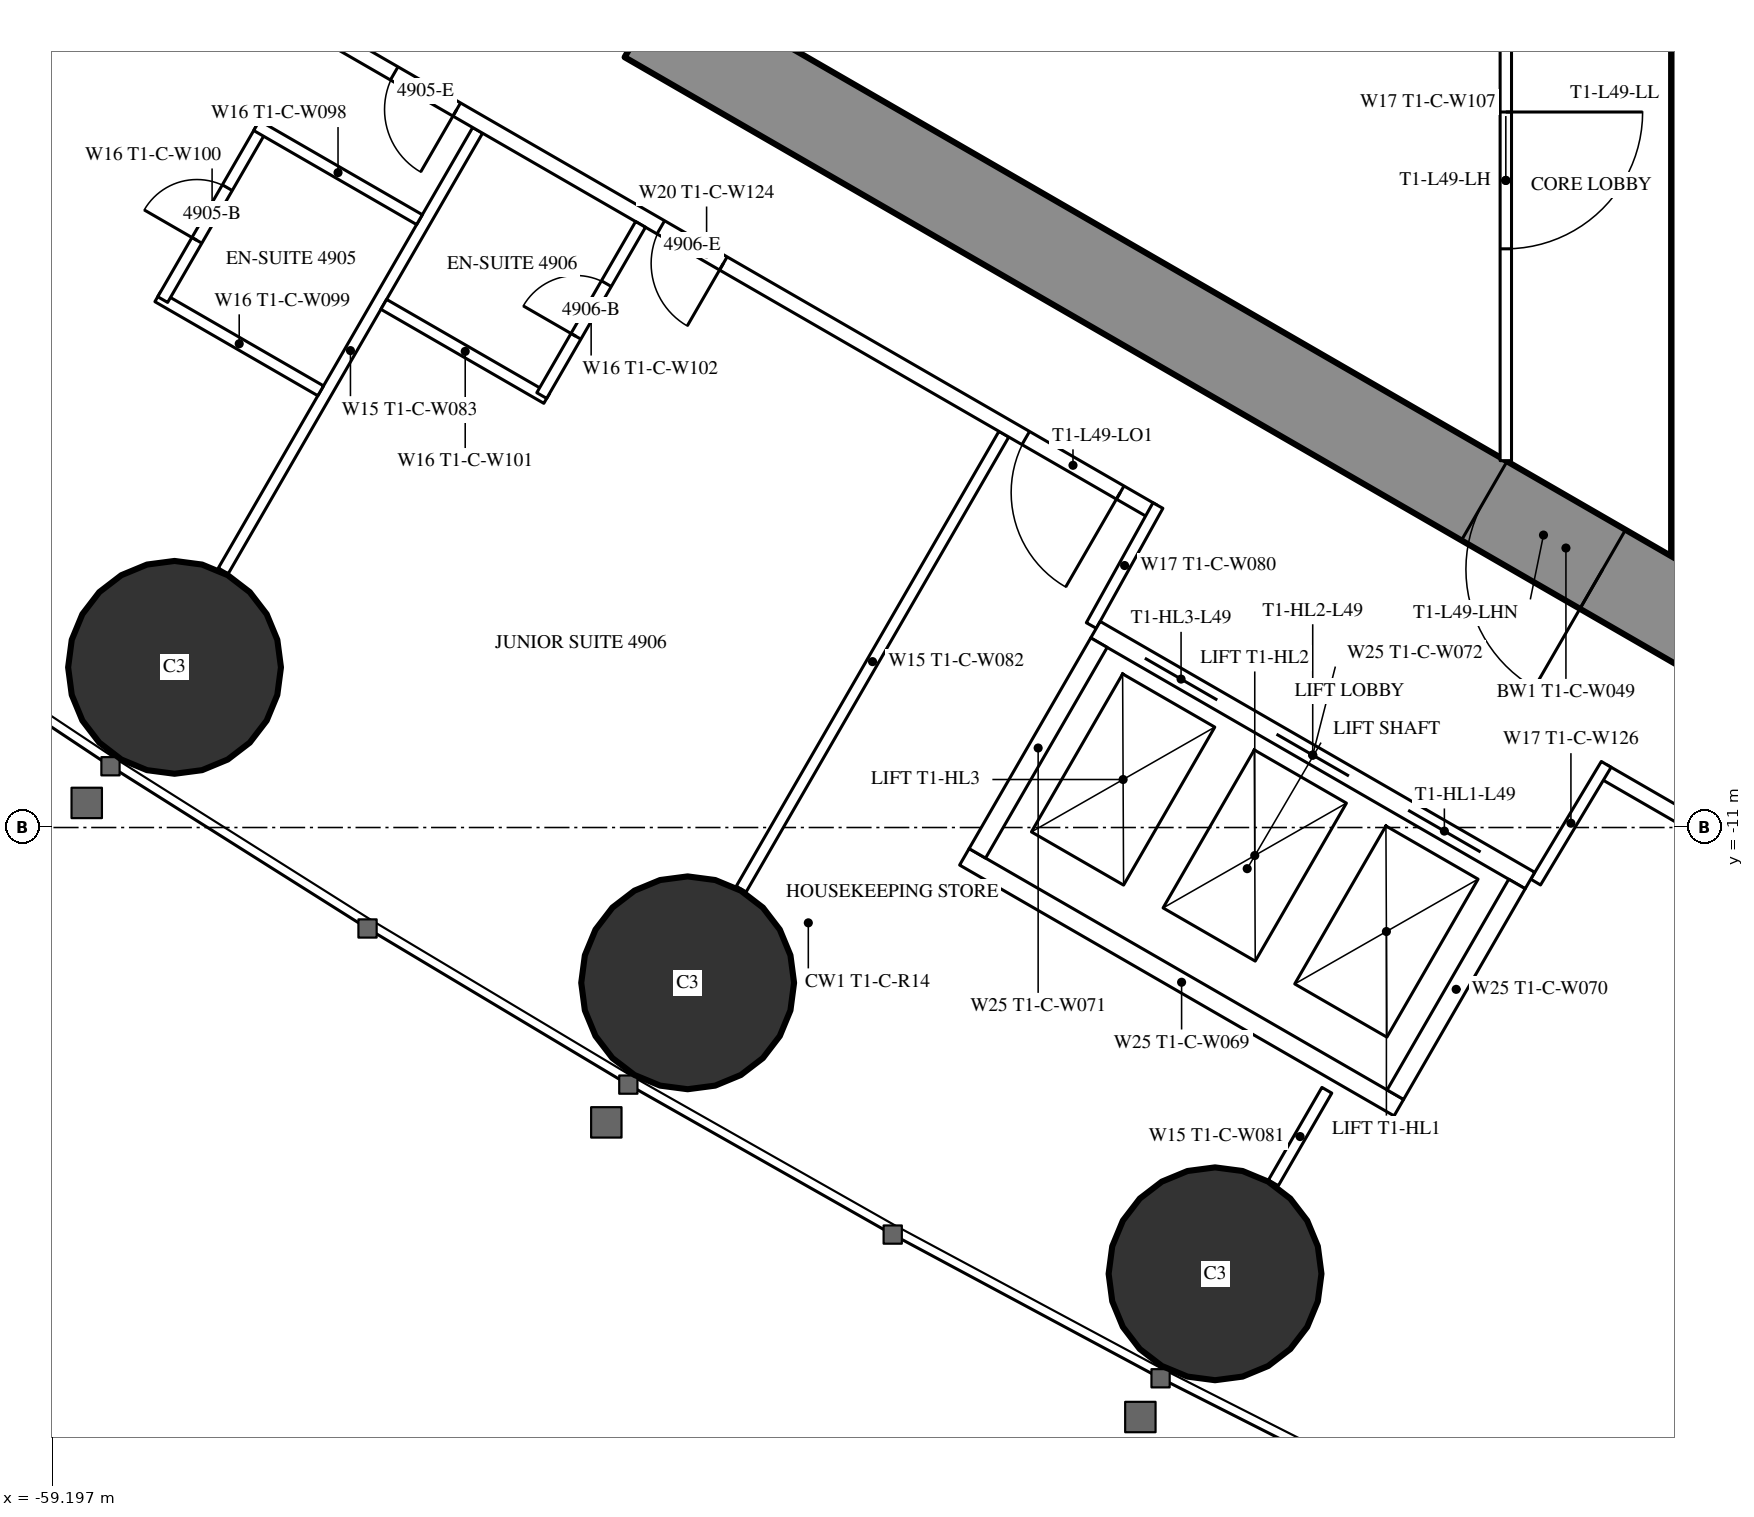
"""IFC4 building model, lengths in metres.
Left out: names, types, materials, properties, quantities, classifications, styles, units other than length and angle.
Written with IfcOpenShell. Run it as: python <this file> out.ifc"""

import sys

from ifc_helpers import new_model, si_unit, direction, frame, frame_2d, origin, origin_2d, place, context, subcontext, project, spatial, rectangle, circle, extrude, element, fill, save


model = new_model("IFC4")
c1 = context("Model", 3, precision=1e-05, world=origin(), true_north=direction((0.0, 1.0)))
c2 = subcontext(c1, "Body", "Model", "MODEL_VIEW")
j1 = project(units=[si_unit("LENGTHUNIT", "METRE"), si_unit("PLANEANGLEUNIT", "RADIAN")], contexts=[c1])
p1 = place(None, origin())
s1 = spatial("IfcSite", under=j1, at=p1, CompositionType="ELEMENT")
p2 = place(p1, origin())
s2 = spatial("IfcBuilding", under=s1, at=p2, CompositionType="ELEMENT")
p3 = place(p2, frame((0.0, 0.0, 184.3)))
s3 = spatial("IfcBuildingStorey", under=s2, at=p3, CompositionType="ELEMENT", Elevation=184.3)
for number, where, z_axis, x_axis in (
    (1, (-57.59, -8.893, 0.0), (0.0, 0.0, 1.0), (1.0, 0.0, 0.0)),
    (2, (-50.839, -13.043, 0.0), (0.0, 0.0, 1.0), (1.0, 0.0, 0.0)),
    (3, (-43.9, -16.871, 0.0), (0.0, 0.0, 1.0), (1.0, 0.0, 0.0)),
):
    element("IfcColumn", number, at=place(p3, frame(where, z_axis=z_axis, x_axis=x_axis)), inside=s3, PredefinedType="COLUMN", context=c2, shape_type="SweptSolid", body=[
        extrude(circle(Radius=1.4, at=origin_2d()), origin(), (0.0, 0.0, 1.0), 3.5),
    ])
p4 = place(p3, frame((-37.3, 8.6, 0.0), z_axis=(0.0, 0.0, 1.0), x_axis=(0.0, -1.0, 0.0)))
e4 = element("IfcWall", 4, at=p4, inside=s3, PredefinedType="SHEAR", context=c2, shape_type="SweptSolid", body=[
    extrude(rectangle(XDim=17.2, YDim=1.2, at=frame_2d((8.6, 0.0))), origin(), (0.0, 0.0, 1.0), 3.5),
])
p5 = place(p4, frame((7.7, 0.0, 0.0)))
e5 = element("IfcOpeningElement", 5, at=p5, cuts=e4, PredefinedType="OPENING", context=c2, shape_type="SweptSolid", body=[
    extrude(rectangle(XDim=1.8, YDim=2.2, at=frame_2d((0.9, 1.1))), frame((0.0, 0.61, 0.0), z_axis=(0.0, -1.0, 0.0), x_axis=(1.0, 0.0, 0.0)), (0.0, 0.0, 1.0), 1.22),
])
p6 = place(p3, frame((-27.2, -14.3, 0.0), z_axis=(0.0, 0.0, 1.0), x_axis=(-0.866024021859, 0.500002393557, 0.0)))
e6 = element("IfcWall", 6, at=p6, inside=s3, PredefinedType="SHEAR", context=c2, shape_type="SweptSolid", body=[
    extrude(rectangle(XDim=27.907, YDim=1.2, at=frame_2d((13.954, 0.0))), origin(), (0.0, 0.0, 1.0), 3.5),
])
p7 = place(p6, frame((4.6, 0.0, 0.0)))
e7 = element("IfcOpeningElement", 7, at=p7, cuts=e6, PredefinedType="OPENING", context=c2, shape_type="SweptSolid", body=[
    extrude(rectangle(XDim=1.0, YDim=2.2, at=frame_2d((0.5, 1.1))), frame((0.0, 0.61, 0.0), z_axis=(0.0, -1.0, 0.0), x_axis=(1.0, 0.0, 0.0)), (0.0, 0.0, 1.0), 1.22),
])
p8 = place(p6, frame((13.395, 0.0, 0.0)))
e8 = element("IfcOpeningElement", 8, at=p8, cuts=e6, PredefinedType="OPENING", context=c2, shape_type="SweptSolid", body=[
    extrude(rectangle(XDim=1.8, YDim=2.2, at=frame_2d((0.9, 1.1))), frame((0.0, 0.61, 0.0), z_axis=(0.0, -1.0, 0.0), x_axis=(1.0, 0.0, 0.0)), (0.0, 0.0, 1.0), 1.22),
])
p9 = place(p3, frame((-46.679, -5.825, 0.0), z_axis=(0.0, 0.0, 1.0), x_axis=(-0.500006839597, -0.866021454905, 0.0)))
e9 = element("IfcWall", 9, at=p9, inside=s3, PredefinedType="PARTITIONING", context=c2, shape_type="SweptSolid", body=[
    extrude(rectangle(XDim=6.911, YDim=0.15, at=frame_2d((3.456, 0.0))), origin(), (0.0, 0.0, 1.0), 2.3),
])
p10 = place(p3, frame((-53.602, -1.828, 0.0), z_axis=(0.0, 0.0, 1.0), x_axis=(-0.49999191814, -0.866030069798, 0.0)))
e10 = element("IfcWall", 10, at=p10, inside=s3, PredefinedType="PARTITIONING", context=c2, shape_type="SweptSolid", body=[
    extrude(rectangle(XDim=6.692, YDim=0.15, at=frame_2d((3.346, 0.0))), origin(), (0.0, 0.0, 1.0), 2.3),
])
p11 = place(p3, frame((-42.429, -14.457, 0.0), z_axis=(0.0, 0.0, 1.0), x_axis=(-0.5000578829, -0.865991982497, 0.0)))
e11 = element("IfcWall", 11, at=p11, inside=s3, PredefinedType="PARTITIONING", context=c2, shape_type="SweptSolid", body=[
    extrude(rectangle(XDim=1.407, YDim=0.15, at=frame_2d((0.704, 0.0))), origin(), (0.0, 0.0, 1.0), 3.25),
])
p12 = place(p3, frame((-27.86, -16.575, 0.0), z_axis=(0.0, 0.0, 1.0), x_axis=(-0.866027756871, 0.499995924312, 0.0)))
e12 = element("IfcWall", 12, at=p12, inside=s3, PredefinedType="PARTITIONING", context=c2, shape_type="SweptSolid", body=[
    extrude(rectangle(XDim=12.622, YDim=0.2, at=frame_2d((6.311, 0.0))), origin(), (0.0, 0.0, 1.0), 3.25),
])
p13 = place(p12, frame((3.75, 0.0, 0.0)))
e13 = element("IfcOpeningElement", 13, at=p13, cuts=e12, PredefinedType="OPENING", context=c2, shape_type="SweptSolid", body=[
    extrude(rectangle(XDim=0.95, YDim=2.2, at=frame_2d((0.475, 1.1))), frame((0.0, 0.11, 0.0), z_axis=(0.0, -1.0, 0.0), x_axis=(1.0, 0.0, 0.0)), (0.0, 0.0, 1.0), 0.22),
])
p14 = place(p3, frame((-44.715, -6.844, 0.0), z_axis=(0.0, 0.0, 1.0), x_axis=(-0.866025261224, 0.500000246922, 0.0)))
e14 = element("IfcWall", 14, at=p14, inside=s3, PredefinedType="PARTITIONING", context=c2, shape_type="SweptSolid", body=[
    extrude(rectangle(XDim=13.567, YDim=0.2, at=frame_2d((6.783, 0.0))), origin(), (0.0, 0.0, 1.0), 3.25),
])
p15 = place(p14, frame((10.579, 0.0, 0.0)))
e15 = element("IfcOpeningElement", 15, at=p15, cuts=e14, PredefinedType="OPENING", context=c2, shape_type="SweptSolid", body=[
    extrude(rectangle(XDim=0.95, YDim=2.2, at=frame_2d((0.475, 1.1))), frame((0.0, 0.11, 0.0), z_axis=(0.0, -1.0, 0.0), x_axis=(1.0, 0.0, 0.0)), (0.0, 0.0, 1.0), 0.22),
])
p16 = place(p14, frame((6.529, 0.0, 0.0)))
e16 = element("IfcOpeningElement", 16, at=p16, cuts=e14, PredefinedType="OPENING", context=c2, shape_type="SweptSolid", body=[
    extrude(rectangle(XDim=0.95, YDim=2.2, at=frame_2d((0.475, 1.1))), frame((0.0, 0.11, 0.0), z_axis=(0.0, -1.0, 0.0), x_axis=(1.0, 0.0, 0.0)), (0.0, 0.0, 1.0), 0.22),
])
p17 = place(p14, frame((0.5, 0.0, 0.0)))
e17 = element("IfcOpeningElement", 17, at=p17, cuts=e14, PredefinedType="OPENING", context=c2, shape_type="SweptSolid", body=[
    extrude(rectangle(XDim=1.435, YDim=2.2, at=frame_2d((0.718, 1.1))), frame((0.0, 0.11, 0.0), z_axis=(0.0, -1.0, 0.0), x_axis=(1.0, 0.0, 0.0)), (0.0, 0.0, 1.0), 0.22),
])
for number, where, z_axis, x_axis in (
    (18, (-39.683, -11.718, 0.0), (0.0, 0.0, 1.0), (0.514, 0.858, 0.0)),
    (19, (-44.652, -6.764, 0.0), (0.0, 0.0, 1.0), (-0.485, -0.874, 0.0)),
):
    element("IfcWall", number, at=place(p3, frame(where, z_axis=z_axis, x_axis=x_axis)), inside=s3, PredefinedType="PARTITIONING", context=c2, shape_type="SweptSolid", body=[
        extrude(rectangle(XDim=1.805, YDim=0.15, at=frame_2d((0.903, 0.0))), origin(), (0.0, 0.0, 1.0), 3.25),
    ])
p18 = place(p3, frame((-55.667, -5.255, 0.0), z_axis=(0.0, 0.0, 1.0), x_axis=(-0.866006523861, 0.500032699561, 0.0)))
e20 = element("IfcWall", 20, at=p18, inside=s3, PredefinedType="PARTITIONING", context=c2, shape_type="SweptSolid", body=[
    extrude(rectangle(XDim=2.475, YDim=0.15, at=frame_2d((1.237, 0.0))), origin(), (0.0, 0.0, 1.0), 3.25),
])
p19 = place(p3, frame((-56.446, -1.803, 0.0), z_axis=(0.0, 0.0, 1.0), x_axis=(-0.499936506574, -0.866062058628, 0.0)))
e21 = element("IfcWall", 21, at=p19, inside=s3, PredefinedType="PARTITIONING", context=c2, shape_type="SweptSolid", body=[
    extrude(rectangle(XDim=2.6, YDim=0.15, at=frame_2d((1.3, 0.0))), origin(), (0.0, 0.0, 1.0), 3.25),
])
p20 = place(p19, frame((0.9, 0.0, 0.0)))
e22 = element("IfcOpeningElement", 22, at=p20, cuts=e21, PredefinedType="OPENING", context=c2, shape_type="SweptSolid", body=[
    extrude(rectangle(XDim=0.8, YDim=2.2, at=frame_2d((0.4, 1.1))), frame((0.0, 0.085, 0.0), z_axis=(0.0, -1.0, 0.0), x_axis=(1.0, 0.0, 0.0)), (0.0, 0.0, 1.0), 0.17),
])
for number, where, z_axis, x_axis in (
    (23, (-54.367, -3.003, 0.0), (0.0, 0.0, 1.0), (-0.866, 0.5, 0.0)),
    (24, (-52.694, -5.355, 0.0), (0.0, 0.0, 1.0), (-0.866, 0.5, 0.0)),
):
    element("IfcWall", number, at=place(p3, frame(where, z_axis=z_axis, x_axis=x_axis)), inside=s3, PredefinedType="PARTITIONING", context=c2, shape_type="SweptSolid", body=[
        extrude(rectangle(XDim=2.475, YDim=0.15, at=frame_2d((1.238, 0.0))), origin(), (0.0, 0.0, 1.0), 3.25),
    ])
p21 = place(p3, frame((-51.459, -3.065, 0.0), z_axis=(0.0, 0.0, 1.0), x_axis=(-0.499936506574, -0.866062058628, 0.0)))
e25 = element("IfcWall", 25, at=p21, inside=s3, PredefinedType="PARTITIONING", context=c2, shape_type="SweptSolid", body=[
    extrude(rectangle(XDim=2.6, YDim=0.15, at=frame_2d((1.3, 0.0))), origin(), (0.0, 0.0, 1.0), 3.25),
])
p22 = place(p21, frame((0.9, 0.0, 0.0)))
e26 = element("IfcOpeningElement", 26, at=p22, cuts=e25, PredefinedType="OPENING", context=c2, shape_type="SweptSolid", body=[
    extrude(rectangle(XDim=0.8, YDim=2.2, at=frame_2d((0.4, 1.1))), frame((0.0, 0.085, 0.0), z_axis=(0.0, -1.0, 0.0), x_axis=(1.0, 0.0, 0.0)), (0.0, 0.0, 1.0), 0.17),
])
p23 = place(p3, frame((-40.075, 1.2, 0.0), z_axis=(0.0, 0.0, 1.0), x_axis=(0.0, -1.0, 0.0)))
e27 = element("IfcWall", 27, at=p23, inside=s3, PredefinedType="PARTITIONING", context=c2, shape_type="SweptSolid", body=[
    extrude(rectangle(XDim=7.374, YDim=0.15, at=frame_2d((3.687, 0.0))), origin(), (0.0, 0.0, 1.0), 3.25),
])
p24 = place(p23, frame((2.787, 0.0, 0.0)))
e28 = element("IfcOpeningElement", 28, at=p24, cuts=e27, PredefinedType="OPENING", context=c2, shape_type="SweptSolid", body=[
    extrude(rectangle(XDim=1.8, YDim=2.2, at=frame_2d((0.9, 1.1))), frame((0.0, 0.085, 0.0), z_axis=(0.0, -1.0, 0.0), x_axis=(1.0, 0.0, 0.0)), (0.0, 0.0, 1.0), 0.17),
])
p25 = place(p3, frame((-39.758, -11.697, 0.0), z_axis=(0.0, 0.0, 1.0), x_axis=(-0.866024194504, 0.500002094529, 0.0)))
e29 = element("IfcWall", 29, at=p25, inside=s3, PredefinedType="PARTITIONING", context=c2, shape_type="SweptSolid", body=[
    extrude(rectangle(XDim=6.6, YDim=0.25, at=frame_2d((3.3, 0.0))), origin(), (0.0, 0.0, 1.0), 3.25),
])
p26 = place(p25, frame((0.75, 0.0, 0.0)))
e30 = element("IfcOpeningElement", 30, at=p26, cuts=e29, PredefinedType="OPENING", context=c2, shape_type="SweptSolid", body=[
    extrude(rectangle(XDim=1.1, YDim=2.2, at=frame_2d((0.55, 1.1))), frame((0.0, 0.135, 0.0), z_axis=(0.0, -1.0, 0.0), x_axis=(1.0, 0.0, 0.0)), (0.0, 0.0, 1.0), 0.27),
])
p27 = place(p25, frame((2.75, 0.0, 0.0)))
e31 = element("IfcOpeningElement", 31, at=p27, cuts=e29, PredefinedType="OPENING", context=c2, shape_type="SweptSolid", body=[
    extrude(rectangle(XDim=1.1, YDim=2.2, at=frame_2d((0.55, 1.1))), frame((0.0, 0.135, 0.0), z_axis=(0.0, -1.0, 0.0), x_axis=(1.0, 0.0, 0.0)), (0.0, 0.0, 1.0), 0.27),
])
p28 = place(p25, frame((4.75, 0.0, 0.0)))
e32 = element("IfcOpeningElement", 32, at=p28, cuts=e29, PredefinedType="OPENING", context=c2, shape_type="SweptSolid", body=[
    extrude(rectangle(XDim=1.1, YDim=2.2, at=frame_2d((0.55, 1.1))), frame((0.0, 0.135, 0.0), z_axis=(0.0, -1.0, 0.0), x_axis=(1.0, 0.0, 0.0)), (0.0, 0.0, 1.0), 0.27),
])
p29 = place(p3, frame((-41.482, -14.686, 0.0), z_axis=(0.0, 0.0, 1.0), x_axis=(-0.86603344179, 0.499986077507, 0.0)))
e33 = element("IfcWall", 33, at=p29, inside=s3, PredefinedType="PARTITIONING", context=c2, shape_type="SweptSolid", body=[
    extrude(rectangle(XDim=6.6, YDim=0.25, at=frame_2d((3.3, 0.0))), origin(), (0.0, 0.0, 1.0), 3.25),
])
for number, where, z_axis, x_axis in (
    (34, (-39.928, -11.743, 0.0), (0.0, 0.0, 1.0), (-0.5, -0.866, 0.0)),
    (35, (-45.428, -8.568, 0.0), (0.0, 0.0, 1.0), (-0.5, -0.866, 0.0)),
):
    element("IfcWall", number, at=place(p3, frame(where, z_axis=z_axis, x_axis=x_axis)), inside=s3, PredefinedType="PARTITIONING", context=c2, shape_type="SweptSolid", body=[
        extrude(rectangle(XDim=3.201, YDim=0.25, at=frame_2d((1.6, 0.0))), origin(), (0.0, 0.0, 1.0), 3.25),
    ])
p30 = place(p20, origin())
e36 = element("IfcDoor", 36, at=p30, inside=s3, OperationType="SINGLE_SWING_RIGHT", PredefinedType="DOOR", context=c2, shape_type="SweptSolid", body=[
    extrude(rectangle(XDim=0.8, YDim=2.2, at=frame_2d((0.4, 1.1))), frame((0.0, 0.025, 0.0), z_axis=(0.0, -1.0, 0.0), x_axis=(1.0, 0.0, 0.0)), (0.0, 0.0, 1.0), 0.05),
])
fill(e22, e36)
p31 = place(p15, origin())
e37 = element("IfcDoor", 37, at=p31, inside=s3, OperationType="SINGLE_SWING_LEFT", PredefinedType="DOOR", context=c2, shape_type="SweptSolid", body=[
    extrude(rectangle(XDim=0.95, YDim=2.2, at=frame_2d((0.475, 1.1))), frame((0.0, 0.025, 0.0), z_axis=(0.0, -1.0, 0.0), x_axis=(1.0, 0.0, 0.0)), (0.0, 0.0, 1.0), 0.05),
])
fill(e15, e37)
p32 = place(p22, origin())
e38 = element("IfcDoor", 38, at=p32, inside=s3, OperationType="SINGLE_SWING_RIGHT", PredefinedType="DOOR", context=c2, shape_type="SweptSolid", body=[
    extrude(rectangle(XDim=0.8, YDim=2.2, at=frame_2d((0.4, 1.1))), frame((0.0, 0.025, 0.0), z_axis=(0.0, -1.0, 0.0), x_axis=(1.0, 0.0, 0.0)), (0.0, 0.0, 1.0), 0.05),
])
fill(e26, e38)
p33 = place(p16, origin())
e39 = element("IfcDoor", 39, at=p33, inside=s3, OperationType="SINGLE_SWING_LEFT", PredefinedType="DOOR", context=c2, shape_type="SweptSolid", body=[
    extrude(rectangle(XDim=0.95, YDim=2.2, at=frame_2d((0.475, 1.1))), frame((0.0, 0.025, 0.0), z_axis=(0.0, -1.0, 0.0), x_axis=(1.0, 0.0, 0.0)), (0.0, 0.0, 1.0), 0.05),
])
fill(e16, e39)
p34 = place(p17, origin())
e40 = element("IfcDoor", 40, at=p34, inside=s3, OperationType="SINGLE_SWING_LEFT", PredefinedType="DOOR", context=c2, shape_type="SweptSolid", body=[
    extrude(rectangle(XDim=1.435, YDim=2.2, at=frame_2d((0.718, 1.1))), frame((0.0, 0.025, 0.0), z_axis=(0.0, -1.0, 0.0), x_axis=(1.0, 0.0, 0.0)), (0.0, 0.0, 1.0), 0.05),
])
fill(e17, e40)
p35 = place(p24, origin())
e41 = element("IfcDoor", 41, at=p35, inside=s3, OperationType="DOUBLE_DOOR_SINGLE_SWING", PredefinedType="DOOR", context=c2, shape_type="SweptSolid", body=[
    extrude(rectangle(XDim=1.8, YDim=2.2, at=frame_2d((0.9, 1.1))), frame((0.0, 0.025, 0.0), z_axis=(0.0, -1.0, 0.0), x_axis=(1.0, 0.0, 0.0)), (0.0, 0.0, 1.0), 0.05),
])
fill(e28, e41)
p36 = place(p8, origin())
e42 = element("IfcDoor", 42, at=p36, inside=s3, OperationType="DOUBLE_DOOR_SINGLE_SWING", PredefinedType="DOOR", context=c2, shape_type="SweptSolid", body=[
    extrude(rectangle(XDim=1.8, YDim=2.2, at=frame_2d((0.9, 1.1))), frame((0.0, 0.025, 0.0), z_axis=(0.0, -1.0, 0.0), x_axis=(1.0, 0.0, 0.0)), (0.0, 0.0, 1.0), 0.05),
])
fill(e8, e42)
p37 = place(p26, origin())
e43 = element("IfcDoor", 43, at=p37, inside=s3, OperationType="DOUBLE_DOOR_SLIDING", PredefinedType="USERDEFINED", context=c2, shape_type="SweptSolid", body=[
    extrude(rectangle(XDim=1.1, YDim=2.2, at=frame_2d((0.55, 1.1))), frame((0.0, 0.025, 0.0), z_axis=(0.0, -1.0, 0.0), x_axis=(1.0, 0.0, 0.0)), (0.0, 0.0, 1.0), 0.05),
])
fill(e30, e43)
p38 = place(p27, origin())
e44 = element("IfcDoor", 44, at=p38, inside=s3, OperationType="DOUBLE_DOOR_SLIDING", PredefinedType="USERDEFINED", context=c2, shape_type="SweptSolid", body=[
    extrude(rectangle(XDim=1.1, YDim=2.2, at=frame_2d((0.55, 1.1))), frame((0.0, 0.025, 0.0), z_axis=(0.0, -1.0, 0.0), x_axis=(1.0, 0.0, 0.0)), (0.0, 0.0, 1.0), 0.05),
])
fill(e31, e44)
p39 = place(p28, origin())
e45 = element("IfcDoor", 45, at=p39, inside=s3, OperationType="DOUBLE_DOOR_SLIDING", PredefinedType="USERDEFINED", context=c2, shape_type="SweptSolid", body=[
    extrude(rectangle(XDim=1.1, YDim=2.2, at=frame_2d((0.55, 1.1))), frame((0.0, 0.025, 0.0), z_axis=(0.0, -1.0, 0.0), x_axis=(1.0, 0.0, 0.0)), (0.0, 0.0, 1.0), 0.05),
])
fill(e32, e45)
save(model, sys.argv[1])
